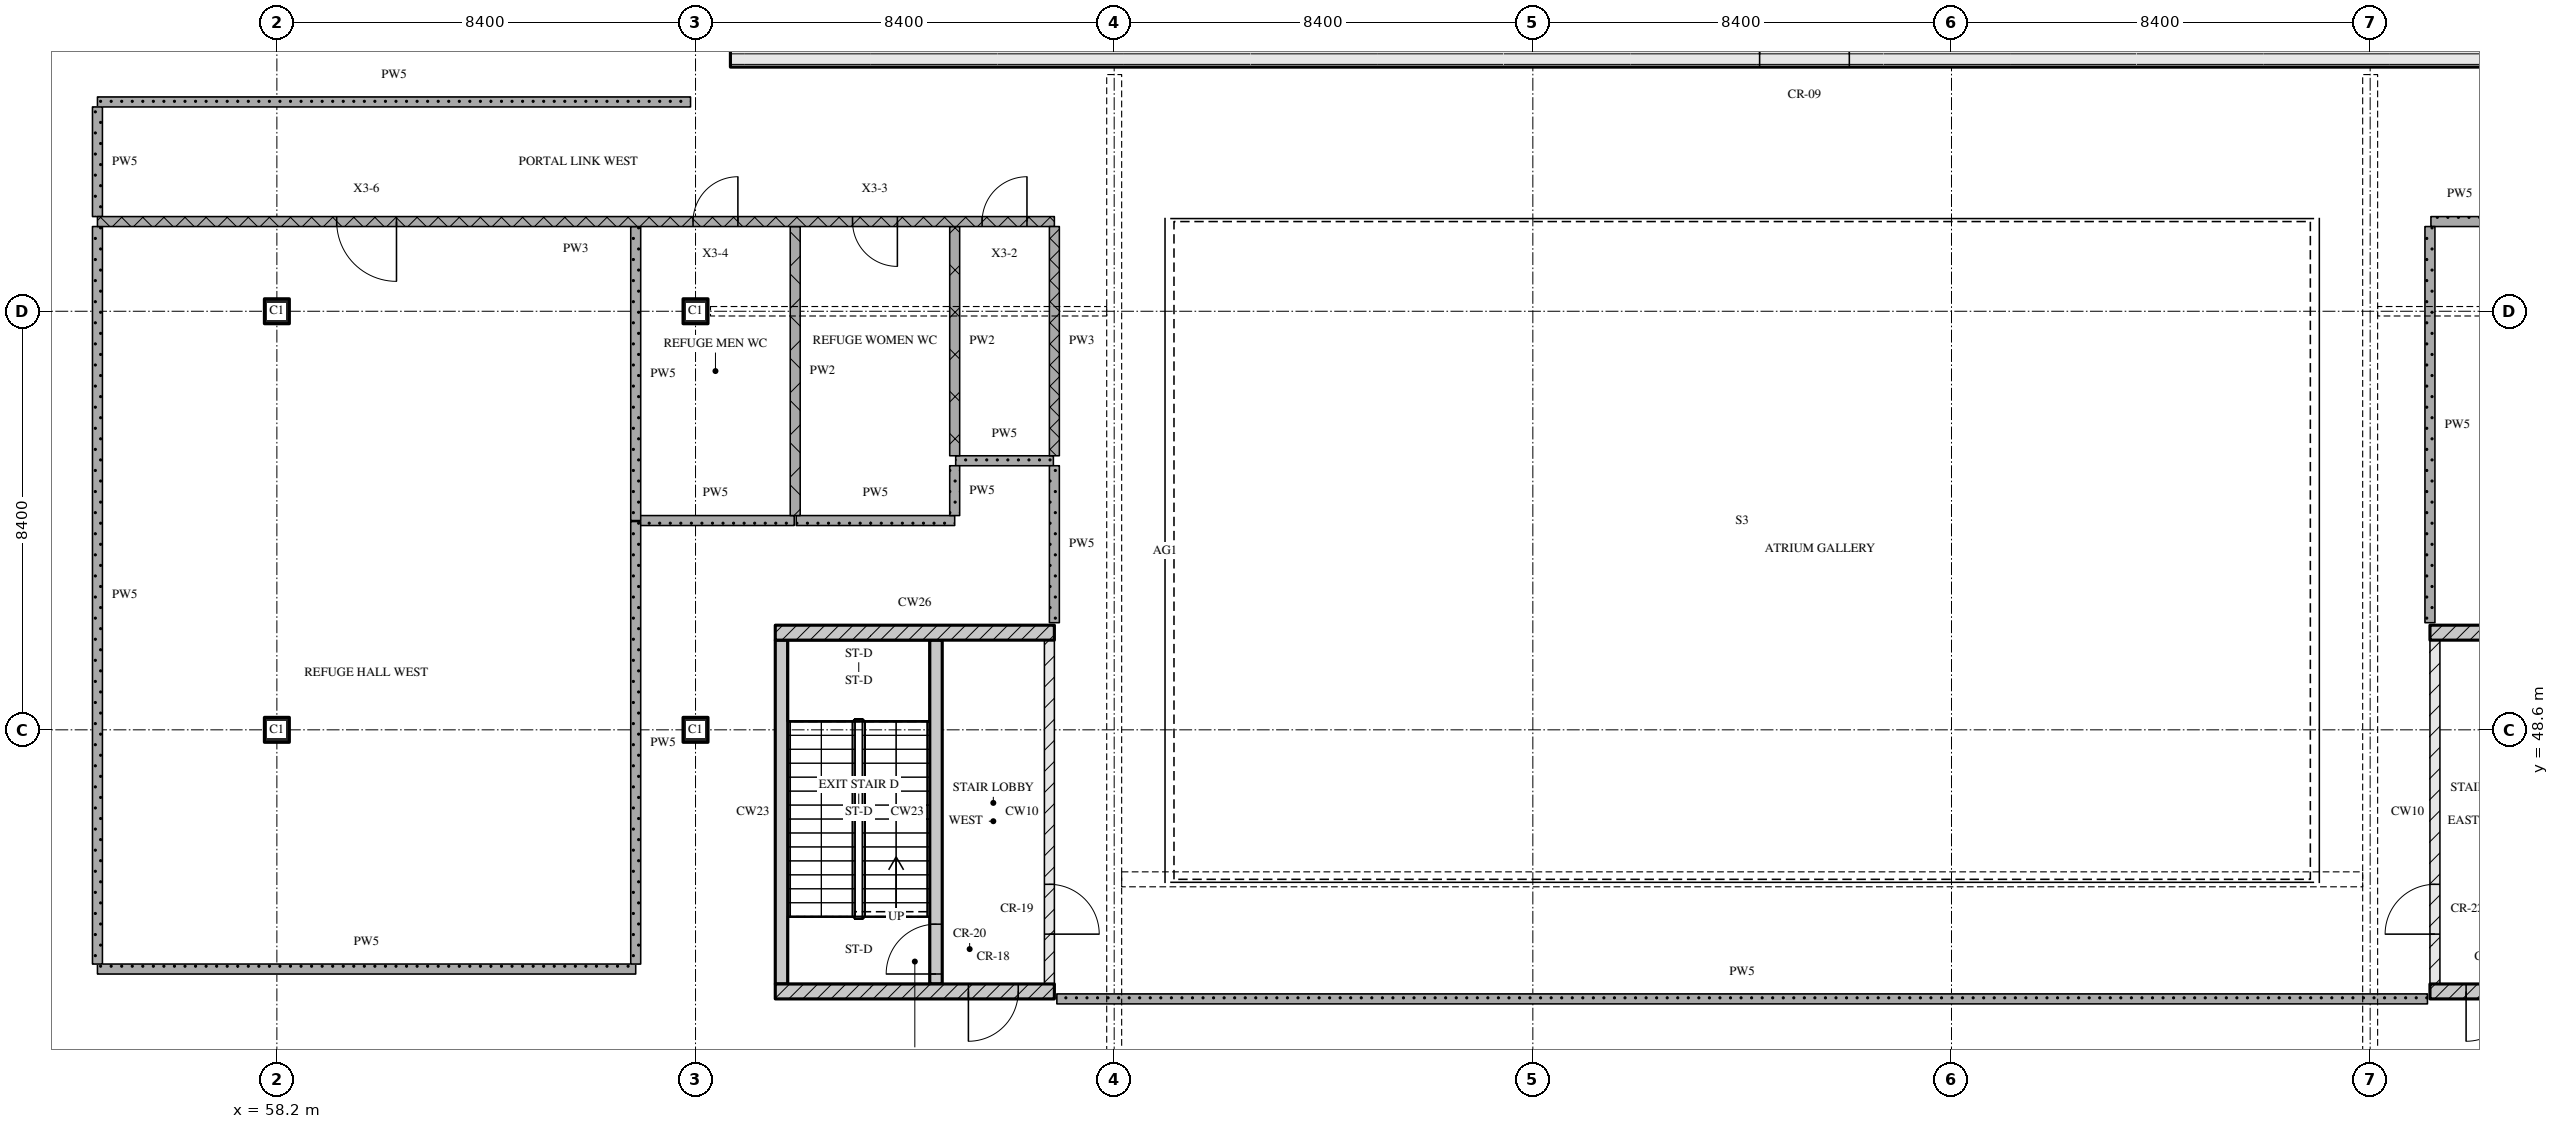
"""IFC4 building model, lengths in metres.
Left out: names, types, materials, properties, quantities, classifications, styles, units other than length and angle.
Written with IfcOpenShell. Run it as: python <this file> out.ifc"""

import sys

from ifc_helpers import new_model, si_unit, direction, frame, frame_2d, origin, origin_2d, place, context, subcontext, project, spatial, rectangle, extrude, element, fill, save


model = new_model("IFC4")
c1 = context("Model", 3, precision=1e-05, world=origin(), true_north=direction((0.0, 1.0)))
c2 = subcontext(c1, "Body", "Model", "MODEL_VIEW")
j1 = project(units=[si_unit("LENGTHUNIT", "METRE"), si_unit("PLANEANGLEUNIT", "RADIAN")], contexts=[c1])
p1 = place(None, origin())
s1 = spatial("IfcSite", under=j1, at=p1, CompositionType="ELEMENT")
p2 = place(p1, origin())
s2 = spatial("IfcBuilding", under=s1, at=p2, CompositionType="ELEMENT")
p3 = place(p2, frame((0.0, 0.0, 252.3)))
s3 = spatial("IfcBuildingStorey", under=s2, at=p3, CompositionType="ELEMENT", Elevation=252.3)
for number, where, z_axis, x_axis in (
    (1, (58.2, 48.6, 0.0), (0.0, 0.0, 1.0), (1.0, 0.0, 0.0)),
    (2, (58.2, 57.0, 0.0), (0.0, 0.0, 1.0), (1.0, 0.0, 0.0)),
    (3, (66.6, 48.6, 0.0), (0.0, 0.0, 1.0), (1.0, 0.0, 0.0)),
    (4, (66.6, 57.0, 0.0), (0.0, 0.0, 1.0), (1.0, 0.0, 0.0)),
):
    element("IfcColumn", number, at=place(p3, frame(where, z_axis=z_axis, x_axis=x_axis)), inside=s3, PredefinedType="COLUMN", context=c2, shape_type="SweptSolid", body=[
        extrude(rectangle(XDim=0.5, YDim=0.5, at=origin_2d()), origin(), (0.0, 0.0, 1.0), 11.25),
    ])
p4 = place(p3, frame((67.3, 62.15, 0.0), z_axis=(0.0, 0.0, 1.0), x_axis=(1.0, 0.0, 0.0)))
e5 = element("IfcWall", 5, at=p4, inside=s3, PredefinedType="SOLIDWALL", context=c2, shape_type="SweptSolid", body=[
    extrude(rectangle(XDim=40.6, YDim=0.5, at=frame_2d((20.3, 0.0))), origin(), (0.0, 0.0, 1.0), 10.97),
])
p5 = place(p4, frame((20.65, 0.0, 0.0)))
e6 = element("IfcOpeningElement", 6, at=p5, cuts=e5, PredefinedType="OPENING", context=c2, shape_type="SweptSolid", body=[
    extrude(rectangle(XDim=1.8, YDim=2.1, at=frame_2d((0.9, 1.05))), frame((0.0, 0.26, 0.0), z_axis=(0.0, -1.0, 0.0), x_axis=(1.0, 0.0, 0.0)), (0.0, 0.0, 1.0), 0.52),
])
p6 = place(p3, frame((68.2, 43.35, 0.0), z_axis=(0.0, 0.0, 1.0), x_axis=(1.0, 0.0, 0.0)))
e7 = element("IfcWall", 7, at=p6, inside=s3, PredefinedType="SOLIDWALL", context=c2, shape_type="SweptSolid", body=[
    extrude(rectangle(XDim=5.6, YDim=0.3, at=frame_2d((2.8, 0.0))), origin(), (0.0, 0.0, 1.0), 10.97),
])
p7 = place(p6, frame((3.875, 0.0, 0.0)))
e8 = element("IfcOpeningElement", 8, at=p7, cuts=e7, PredefinedType="OPENING", context=c2, shape_type="SweptSolid", body=[
    extrude(rectangle(XDim=1.0, YDim=2.1, at=frame_2d((0.5, 1.05))), frame((0.0, 0.16, 0.0), z_axis=(0.0, -1.0, 0.0), x_axis=(1.0, 0.0, 0.0)), (0.0, 0.0, 1.0), 0.32),
])
p8 = place(p3, frame((68.325, 43.5, 0.0), z_axis=(0.0, 0.0, 1.0), x_axis=(0.0, 1.0, 0.0)))
e9 = element("IfcWall", 9, at=p8, inside=s3, PredefinedType="SOLIDWALL", context=c2, shape_type="SweptSolid", body=[
    extrude(rectangle(XDim=6.9, YDim=0.25, at=frame_2d((3.45, 0.0))), origin(), (0.0, 0.0, 1.0), 10.97),
])
p9 = place(p3, frame((71.425, 43.5, 0.0), z_axis=(0.0, 0.0, 1.0), x_axis=(0.0, 1.0, 0.0)))
e10 = element("IfcWall", 10, at=p9, inside=s3, PredefinedType="SOLIDWALL", context=c2, shape_type="SweptSolid", body=[
    extrude(rectangle(XDim=6.9, YDim=0.25, at=frame_2d((3.45, 0.0))), origin(), (0.0, 0.0, 1.0), 10.97),
])
p10 = place(p9, frame((0.2, 0.0, 0.0)))
e11 = element("IfcOpeningElement", 11, at=p10, cuts=e10, PredefinedType="OPENING", context=c2, shape_type="SweptSolid", body=[
    extrude(rectangle(XDim=1.0, YDim=2.1, at=frame_2d((0.5, 1.05))), frame((0.0, 0.135, 0.0), z_axis=(0.0, -1.0, 0.0), x_axis=(1.0, 0.0, 0.0)), (0.0, 0.0, 1.0), 0.27),
])
p11 = place(p3, frame((73.7, 43.5, 0.0), z_axis=(0.0, 0.0, 1.0), x_axis=(0.0, 1.0, 0.0)))
e12 = element("IfcWall", 12, at=p11, inside=s3, PredefinedType="PARTITIONING", context=c2, shape_type="SweptSolid", body=[
    extrude(rectangle(XDim=6.9, YDim=0.2, at=frame_2d((3.45, 0.0))), origin(), (0.0, 0.0, 1.0), 10.97),
])
p12 = place(p11, frame((1.0, 0.0, 0.0)))
e13 = element("IfcOpeningElement", 13, at=p12, cuts=e12, PredefinedType="OPENING", context=c2, shape_type="SweptSolid", body=[
    extrude(rectangle(XDim=1.0, YDim=2.1, at=frame_2d((0.5, 1.05))), frame((0.0, 0.11, 0.0), z_axis=(0.0, -1.0, 0.0), x_axis=(1.0, 0.0, 0.0)), (0.0, 0.0, 1.0), 0.22),
])
p13 = place(p3, frame((68.2, 50.55, 0.0), z_axis=(0.0, 0.0, 1.0), x_axis=(1.0, 0.0, 0.0)))
e14 = element("IfcWall", 14, at=p13, inside=s3, PredefinedType="SOLIDWALL", context=c2, shape_type="SweptSolid", body=[
    extrude(rectangle(XDim=5.6, YDim=0.3, at=frame_2d((2.8, 0.0))), origin(), (0.0, 0.0, 1.0), 10.97),
])
p14 = place(p3, frame((101.4, 43.35, 0.0), z_axis=(0.0, 0.0, 1.0), x_axis=(1.0, 0.0, 0.0)))
e15 = element("IfcWall", 15, at=p14, inside=s3, PredefinedType="SOLIDWALL", context=c2, shape_type="SweptSolid", body=[
    extrude(rectangle(XDim=5.6, YDim=0.3, at=frame_2d((2.8, 0.0))), origin(), (0.0, 0.0, 1.0), 10.97),
])
p15 = place(p14, frame((0.725, 0.0, 0.0)))
e16 = element("IfcOpeningElement", 16, at=p15, cuts=e15, PredefinedType="OPENING", context=c2, shape_type="SweptSolid", body=[
    extrude(rectangle(XDim=1.0, YDim=2.1, at=frame_2d((0.5, 1.05))), frame((0.0, 0.16, 0.0), z_axis=(0.0, -1.0, 0.0), x_axis=(1.0, 0.0, 0.0)), (0.0, 0.0, 1.0), 0.32),
])
p16 = place(p3, frame((101.5, 43.5, 0.0), z_axis=(0.0, 0.0, 1.0), x_axis=(0.0, 1.0, 0.0)))
e17 = element("IfcWall", 17, at=p16, inside=s3, PredefinedType="PARTITIONING", context=c2, shape_type="SweptSolid", body=[
    extrude(rectangle(XDim=6.9, YDim=0.2, at=frame_2d((3.45, 0.0))), origin(), (0.0, 0.0, 1.0), 10.97),
])
p17 = place(p16, frame((1.0, 0.0, 0.0)))
e18 = element("IfcOpeningElement", 18, at=p17, cuts=e17, PredefinedType="OPENING", context=c2, shape_type="SweptSolid", body=[
    extrude(rectangle(XDim=1.0, YDim=2.1, at=frame_2d((0.5, 1.05))), frame((0.0, 0.11, 0.0), z_axis=(0.0, -1.0, 0.0), x_axis=(1.0, 0.0, 0.0)), (0.0, 0.0, 1.0), 0.22),
])
p18 = place(p3, frame((101.4, 50.55, 0.0), z_axis=(0.0, 0.0, 1.0), x_axis=(1.0, 0.0, 0.0)))
e19 = element("IfcWall", 19, at=p18, inside=s3, PredefinedType="SOLIDWALL", context=c2, shape_type="SweptSolid", body=[
    extrude(rectangle(XDim=5.6, YDim=0.3, at=frame_2d((2.8, 0.0))), origin(), (0.0, 0.0, 1.0), 10.97),
])
p19 = place(p3, frame((73.85, 43.2, 0.0), z_axis=(0.0, 0.0, 1.0), x_axis=(1.0, 0.0, 0.0)))
e20 = element("IfcWall", 20, at=p19, inside=s3, PredefinedType="PARTITIONING", context=c2, shape_type="SweptSolid", body=[
    extrude(rectangle(XDim=27.5, YDim=0.2, at=frame_2d((13.75, 0.0))), origin(), (0.0, 0.0, 1.0), 10.97),
])
p20 = place(p3, frame((54.6, 43.8, 0.0), z_axis=(0.0, 0.0, 1.0), x_axis=(1.0, 0.0, 0.0)))
e21 = element("IfcWall", 21, at=p20, inside=s3, PredefinedType="PARTITIONING", context=c2, shape_type="SweptSolid", body=[
    extrude(rectangle(XDim=10.8, YDim=0.2, at=frame_2d((5.4, 0.0))), origin(), (0.0, 0.0, 1.0), 10.97),
])
p21 = place(p3, frame((65.42, 52.8, 0.0), z_axis=(0.0, 0.0, 1.0), x_axis=(1.0, 0.0, 0.0)))
e22 = element("IfcWall", 22, at=p21, inside=s3, PredefinedType="PARTITIONING", context=c2, shape_type="SweptSolid", body=[
    extrude(rectangle(XDim=3.16, YDim=0.2, at=frame_2d((1.58, 0.0))), origin(), (0.0, 0.0, 1.0), 10.97),
])
p22 = place(p3, frame((68.62, 52.8, 0.0), z_axis=(0.0, 0.0, 1.0), x_axis=(1.0, 0.0, 0.0)))
e23 = element("IfcWall", 23, at=p22, inside=s3, PredefinedType="PARTITIONING", context=c2, shape_type="SweptSolid", body=[
    extrude(rectangle(XDim=3.18, YDim=0.2, at=frame_2d((1.59, 0.0))), origin(), (0.0, 0.0, 1.0), 10.97),
])
p23 = place(p3, frame((71.82, 54.0, 0.0), z_axis=(0.0, 0.0, 1.0), x_axis=(1.0, 0.0, 0.0)))
e24 = element("IfcWall", 24, at=p23, inside=s3, PredefinedType="PARTITIONING", context=c2, shape_type="SweptSolid", body=[
    extrude(rectangle(XDim=1.96, YDim=0.2, at=frame_2d((0.98, 0.0))), origin(), (0.0, 0.0, 1.0), 10.97),
])
p24 = place(p3, frame((73.8, 58.8, 0.0), z_axis=(0.0, 0.0, 1.0), x_axis=(-1.0, 0.0, 0.0)))
e25 = element("IfcWall", 25, at=p24, inside=s3, PredefinedType="PARTITIONING", context=c2, shape_type="SweptSolid", body=[
    extrude(rectangle(XDim=19.2, YDim=0.2, at=frame_2d((9.6, 0.0))), origin(), (0.0, 0.0, 1.0), 10.97),
])
p25 = place(p24, frame((0.55, 0.0, 0.0)))
e26 = element("IfcOpeningElement", 26, at=p25, cuts=e25, PredefinedType="OPENING", context=c2, shape_type="SweptSolid", body=[
    extrude(rectangle(XDim=0.9, YDim=2.1, at=frame_2d((0.45, 1.05))), frame((0.0, 0.11, 0.0), z_axis=(0.0, -1.0, 0.0), x_axis=(1.0, 0.0, 0.0)), (0.0, 0.0, 1.0), 0.22),
])
p26 = place(p24, frame((3.15, 0.0, 0.0)))
e27 = element("IfcOpeningElement", 27, at=p26, cuts=e25, PredefinedType="OPENING", context=c2, shape_type="SweptSolid", body=[
    extrude(rectangle(XDim=0.9, YDim=2.1, at=frame_2d((0.45, 1.05))), frame((0.0, 0.11, 0.0), z_axis=(0.0, -1.0, 0.0), x_axis=(1.0, 0.0, 0.0)), (0.0, 0.0, 1.0), 0.22),
])
p27 = place(p24, frame((6.35, 0.0, 0.0)))
e28 = element("IfcOpeningElement", 28, at=p27, cuts=e25, PredefinedType="OPENING", context=c2, shape_type="SweptSolid", body=[
    extrude(rectangle(XDim=0.9, YDim=2.1, at=frame_2d((0.45, 1.05))), frame((0.0, 0.11, 0.0), z_axis=(0.0, -1.0, 0.0), x_axis=(1.0, 0.0, 0.0)), (0.0, 0.0, 1.0), 0.22),
])
p28 = place(p24, frame((13.2, 0.0, 0.0)))
e29 = element("IfcOpeningElement", 29, at=p28, cuts=e25, PredefinedType="OPENING", context=c2, shape_type="SweptSolid", body=[
    extrude(rectangle(XDim=1.2, YDim=2.1, at=frame_2d((0.6, 1.05))), frame((0.0, 0.11, 0.0), z_axis=(0.0, -1.0, 0.0), x_axis=(1.0, 0.0, 0.0)), (0.0, 0.0, 1.0), 0.22),
])
p29 = place(p3, frame((101.42, 58.8, 0.0), z_axis=(0.0, 0.0, 1.0), x_axis=(1.0, 0.0, 0.0)))
e30 = element("IfcWall", 30, at=p29, inside=s3, PredefinedType="PARTITIONING", context=c2, shape_type="SweptSolid", body=[
    extrude(rectangle(XDim=1.16, YDim=0.2, at=frame_2d((0.58, 0.0))), origin(), (0.0, 0.0, 1.0), 10.97),
])
p30 = place(p3, frame((54.6, 61.2, 0.0), z_axis=(0.0, 0.0, 1.0), x_axis=(1.0, 0.0, 0.0)))
e31 = element("IfcWall", 31, at=p30, inside=s3, PredefinedType="PARTITIONING", context=c2, shape_type="SweptSolid", body=[
    extrude(rectangle(XDim=11.9, YDim=0.2, at=frame_2d((5.95, 0.0))), origin(), (0.0, 0.0, 1.0), 10.97),
])
p31 = place(p3, frame((54.6, 58.7, 0.0), z_axis=(0.0, 0.0, 1.0), x_axis=(0.0, -1.0, 0.0)))
e32 = element("IfcWall", 32, at=p31, inside=s3, PredefinedType="PARTITIONING", context=c2, shape_type="SweptSolid", body=[
    extrude(rectangle(XDim=14.8, YDim=0.2, at=frame_2d((7.4, 0.0))), origin(), (0.0, 0.0, 1.0), 10.97),
])
p32 = place(p3, frame((54.6, 61.1, 0.0), z_axis=(0.0, 0.0, 1.0), x_axis=(0.0, -1.0, 0.0)))
e33 = element("IfcWall", 33, at=p32, inside=s3, PredefinedType="PARTITIONING", context=c2, shape_type="SweptSolid", body=[
    extrude(rectangle(XDim=2.2, YDim=0.2, at=frame_2d((1.1, 0.0))), origin(), (0.0, 0.0, 1.0), 10.97),
])
p33 = place(p3, frame((65.4, 52.78, 0.0), z_axis=(0.0, 0.0, 1.0), x_axis=(0.0, -1.0, 0.0)))
e34 = element("IfcWall", 34, at=p33, inside=s3, PredefinedType="PARTITIONING", context=c2, shape_type="SweptSolid", body=[
    extrude(rectangle(XDim=8.88, YDim=0.2, at=frame_2d((4.44, 0.0))), origin(), (0.0, 0.0, 1.0), 10.97),
])
p34 = place(p3, frame((65.4, 58.7, 0.0), z_axis=(0.0, 0.0, 1.0), x_axis=(0.0, -1.0, 0.0)))
e35 = element("IfcWall", 35, at=p34, inside=s3, PredefinedType="PARTITIONING", context=c2, shape_type="SweptSolid", body=[
    extrude(rectangle(XDim=5.9, YDim=0.2, at=frame_2d((2.95, 0.0))), origin(), (0.0, 0.0, 1.0), 10.97),
])
p35 = place(p3, frame((68.6, 58.7, 0.0), z_axis=(0.0, 0.0, 1.0), x_axis=(0.0, -1.0, 0.0)))
e36 = element("IfcWall", 36, at=p35, inside=s3, PredefinedType="PARTITIONING", context=c2, shape_type="SweptSolid", body=[
    extrude(rectangle(XDim=5.8, YDim=0.2, at=frame_2d((2.9, 0.0))), origin(), (0.0, 0.0, 1.0), 10.97),
])
p36 = place(p3, frame((71.8, 58.7, 0.0), z_axis=(0.0, 0.0, 1.0), x_axis=(0.0, -1.0, 0.0)))
e37 = element("IfcWall", 37, at=p36, inside=s3, PredefinedType="PARTITIONING", context=c2, shape_type="SweptSolid", body=[
    extrude(rectangle(XDim=4.6, YDim=0.2, at=frame_2d((2.3, 0.0))), origin(), (0.0, 0.0, 1.0), 10.97),
])
p37 = place(p3, frame((71.8, 53.9, 0.0), z_axis=(0.0, 0.0, 1.0), x_axis=(0.0, -1.0, 0.0)))
e38 = element("IfcWall", 38, at=p37, inside=s3, PredefinedType="PARTITIONING", context=c2, shape_type="SweptSolid", body=[
    extrude(rectangle(XDim=1.0, YDim=0.2, at=frame_2d((0.5, 0.0))), origin(), (0.0, 0.0, 1.0), 10.97),
])
p38 = place(p3, frame((73.8, 58.7, 0.0), z_axis=(0.0, 0.0, 1.0), x_axis=(0.0, -1.0, 0.0)))
e39 = element("IfcWall", 39, at=p38, inside=s3, PredefinedType="PARTITIONING", context=c2, shape_type="SweptSolid", body=[
    extrude(rectangle(XDim=4.6, YDim=0.2, at=frame_2d((2.3, 0.0))), origin(), (0.0, 0.0, 1.0), 10.97),
])
p39 = place(p3, frame((73.8, 53.9, 0.0), z_axis=(0.0, 0.0, 1.0), x_axis=(0.0, -1.0, 0.0)))
e40 = element("IfcWall", 40, at=p39, inside=s3, PredefinedType="PARTITIONING", context=c2, shape_type="SweptSolid", body=[
    extrude(rectangle(XDim=3.15, YDim=0.2, at=frame_2d((1.575, 0.0))), origin(), (0.0, 0.0, 1.0), 10.97),
])
p40 = place(p3, frame((101.4, 58.7, 0.0), z_axis=(0.0, 0.0, 1.0), x_axis=(0.0, -1.0, 0.0)))
e41 = element("IfcWall", 41, at=p40, inside=s3, PredefinedType="PARTITIONING", context=c2, shape_type="SweptSolid", body=[
    extrude(rectangle(XDim=7.95, YDim=0.2, at=frame_2d((3.975, 0.0))), origin(), (0.0, 0.0, 1.0), 10.97),
])
p41 = place(p5, origin())
e42 = element("IfcDoor", 42, at=p41, inside=s3, OperationType="DOUBLE_DOOR_SINGLE_SWING", PredefinedType="DOOR", context=c2, shape_type="SweptSolid", body=[
    extrude(rectangle(XDim=1.8, YDim=2.1, at=frame_2d((0.9, 1.05))), frame((0.0, 0.025, 0.0), z_axis=(0.0, -1.0, 0.0), x_axis=(1.0, 0.0, 0.0)), (0.0, 0.0, 1.0), 0.05),
])
fill(e6, e42)
p42 = place(p7, origin())
e43 = element("IfcDoor", 43, at=p42, inside=s3, OperationType="SINGLE_SWING_RIGHT", PredefinedType="DOOR", context=c2, shape_type="SweptSolid", body=[
    extrude(rectangle(XDim=1.0, YDim=2.1, at=frame_2d((0.5, 1.05))), frame((0.0, 0.025, 0.0), z_axis=(0.0, -1.0, 0.0), x_axis=(1.0, 0.0, 0.0)), (0.0, 0.0, 1.0), 0.05),
])
fill(e8, e43)
p43 = place(p10, origin())
e44 = element("IfcDoor", 44, at=p43, inside=s3, OperationType="SINGLE_SWING_LEFT", PredefinedType="DOOR", context=c2, shape_type="SweptSolid", body=[
    extrude(rectangle(XDim=1.0, YDim=2.1, at=frame_2d((0.5, 1.05))), frame((0.0, 0.025, 0.0), z_axis=(0.0, -1.0, 0.0), x_axis=(1.0, 0.0, 0.0)), (0.0, 0.0, 1.0), 0.05),
])
fill(e11, e44)
p44 = place(p12, origin())
e45 = element("IfcDoor", 45, at=p44, inside=s3, OperationType="SINGLE_SWING_RIGHT", PredefinedType="DOOR", context=c2, shape_type="SweptSolid", body=[
    extrude(rectangle(XDim=1.0, YDim=2.1, at=frame_2d((0.5, 1.05))), frame((0.0, 0.025, 0.0), z_axis=(0.0, -1.0, 0.0), x_axis=(1.0, 0.0, 0.0)), (0.0, 0.0, 1.0), 0.05),
])
fill(e13, e45)
p45 = place(p15, origin())
e46 = element("IfcDoor", 46, at=p45, inside=s3, OperationType="SINGLE_SWING_RIGHT", PredefinedType="DOOR", context=c2, shape_type="SweptSolid", body=[
    extrude(rectangle(XDim=1.0, YDim=2.1, at=frame_2d((0.5, 1.05))), frame((0.0, 0.025, 0.0), z_axis=(0.0, -1.0, 0.0), x_axis=(1.0, 0.0, 0.0)), (0.0, 0.0, 1.0), 0.05),
])
fill(e16, e46)
p46 = place(p17, origin())
e47 = element("IfcDoor", 47, at=p46, inside=s3, OperationType="SINGLE_SWING_LEFT", PredefinedType="DOOR", context=c2, shape_type="SweptSolid", body=[
    extrude(rectangle(XDim=1.0, YDim=2.1, at=frame_2d((0.5, 1.05))), frame((0.0, 0.025, 0.0), z_axis=(0.0, -1.0, 0.0), x_axis=(1.0, 0.0, 0.0)), (0.0, 0.0, 1.0), 0.05),
])
fill(e18, e47)
p47 = place(p25, origin())
e48 = element("IfcDoor", 48, at=p47, inside=s3, OperationType="SINGLE_SWING_RIGHT", PredefinedType="DOOR", context=c2, shape_type="SweptSolid", body=[
    extrude(rectangle(XDim=0.9, YDim=2.1, at=frame_2d((0.45, 1.05))), frame((0.0, 0.025, 0.0), z_axis=(0.0, -1.0, 0.0), x_axis=(1.0, 0.0, 0.0)), (0.0, 0.0, 1.0), 0.05),
])
fill(e26, e48)
p48 = place(p26, origin())
e49 = element("IfcDoor", 49, at=p48, inside=s3, OperationType="SINGLE_SWING_LEFT", PredefinedType="DOOR", context=c2, shape_type="SweptSolid", body=[
    extrude(rectangle(XDim=0.9, YDim=2.1, at=frame_2d((0.45, 1.05))), frame((0.0, 0.025, 0.0), z_axis=(0.0, -1.0, 0.0), x_axis=(1.0, 0.0, 0.0)), (0.0, 0.0, 1.0), 0.05),
])
fill(e27, e49)
p49 = place(p27, origin())
e50 = element("IfcDoor", 50, at=p49, inside=s3, OperationType="SINGLE_SWING_RIGHT", PredefinedType="DOOR", context=c2, shape_type="SweptSolid", body=[
    extrude(rectangle(XDim=0.9, YDim=2.1, at=frame_2d((0.45, 1.05))), frame((0.0, 0.025, 0.0), z_axis=(0.0, -1.0, 0.0), x_axis=(1.0, 0.0, 0.0)), (0.0, 0.0, 1.0), 0.05),
])
fill(e28, e50)
p50 = place(p28, origin())
e51 = element("IfcDoor", 51, at=p50, inside=s3, OperationType="SINGLE_SWING_LEFT", PredefinedType="DOOR", context=c2, shape_type="SweptSolid", body=[
    extrude(rectangle(XDim=1.2, YDim=2.1, at=frame_2d((0.6, 1.05))), frame((0.0, 0.025, 0.0), z_axis=(0.0, -1.0, 0.0), x_axis=(1.0, 0.0, 0.0)), (0.0, 0.0, 1.0), 0.05),
])
fill(e29, e51)
save(model, sys.argv[1])
